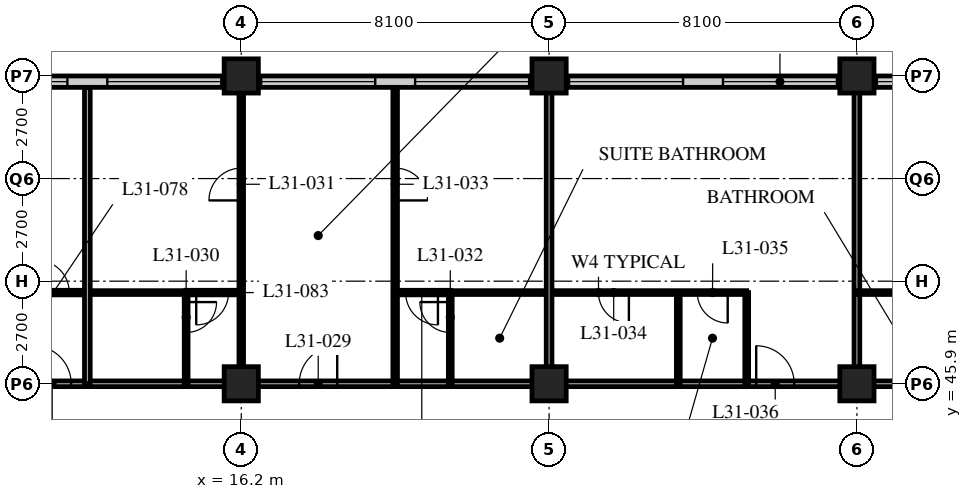
"""IFC4 building model, lengths in metres.
Left out: names, types, materials, properties, quantities, classifications, styles, units other than length and angle.
Written with IfcOpenShell. Run it as: python <this file> out.ifc"""

import sys

from ifc_helpers import new_model, si_unit, direction, frame, frame_2d, origin, origin_2d, place, context, subcontext, project, spatial, rectangle, hollow_rectangle, extrude, element, fill, save


model = new_model("IFC4")
c1 = context("Model", 3, precision=1e-05, world=origin(), true_north=direction((0.0, 1.0)))
c2 = subcontext(c1, "Body", "Model", "MODEL_VIEW")
j1 = project(units=[si_unit("LENGTHUNIT", "METRE"), si_unit("PLANEANGLEUNIT", "RADIAN")], contexts=[c1])
p1 = place(None, origin())
s1 = spatial("IfcSite", under=j1, at=p1, CompositionType="ELEMENT")
p2 = place(p1, origin())
s2 = spatial("IfcBuilding", under=s1, at=p2, CompositionType="ELEMENT")
p3 = place(p2, frame((0.0, 0.0, 123.8)))
s3 = spatial("IfcBuildingStorey", under=s2, at=p3, CompositionType="ELEMENT", Elevation=123.8)
for number, where, z_axis, x_axis in (
    (1, (16.2, 45.9, 0.0), (0.0, 0.0, 1.0), (1.0, 0.0, 0.0)),
    (2, (16.2, 54.0, 0.0), (0.0, 0.0, 1.0), (1.0, 0.0, 0.0)),
    (3, (24.3, 45.9, 0.0), (0.0, 0.0, 1.0), (1.0, 0.0, 0.0)),
    (4, (24.3, 54.0, 0.0), (0.0, 0.0, 1.0), (1.0, 0.0, 0.0)),
    (5, (32.4, 45.9, 0.0), (0.0, 0.0, 1.0), (1.0, 0.0, 0.0)),
    (6, (32.4, 54.0, 0.0), (0.0, 0.0, 1.0), (1.0, 0.0, 0.0)),
):
    element("IfcColumn", number, at=place(p3, frame(where, z_axis=z_axis, x_axis=x_axis)), inside=s3, PredefinedType="COLUMN", context=c2, shape_type="SweptSolid", body=[
        extrude(hollow_rectangle(XDim=0.9, YDim=0.9, WallThickness=0.09, at=origin_2d()), origin(), (0.0, 0.0, 1.0), 3.4),
    ])
p4 = place(p3, frame((48.3, 53.85, 0.0), z_axis=(0.0, 0.0, 1.0), x_axis=(-1.0, 0.0, 0.0)))
e7 = element("IfcWall", 7, at=p4, inside=s3, PredefinedType="SOLIDWALL", context=c2, shape_type="SweptSolid", body=[
    extrude(rectangle(XDim=40.2, YDim=0.3, at=frame_2d((20.1, 0.0))), origin(), (0.0, 0.0, 1.0), 3.19),
])
p5 = place(p4, frame((0.225, 0.0, 0.9)))
e8 = element("IfcOpeningElement", 8, at=p5, cuts=e7, PredefinedType="OPENING", context=c2, shape_type="SweptSolid", body=[
    extrude(rectangle(XDim=3.0, YDim=2.0, at=frame_2d((1.5, 1.0))), frame((0.0, 0.16, 0.0), z_axis=(0.0, -1.0, 0.0), x_axis=(1.0, 0.0, 0.0)), (0.0, 0.0, 1.0), 0.32),
])
p6 = place(p4, frame((4.275, 0.0, 0.9)))
e9 = element("IfcOpeningElement", 9, at=p6, cuts=e7, PredefinedType="OPENING", context=c2, shape_type="SweptSolid", body=[
    extrude(rectangle(XDim=3.0, YDim=2.0, at=frame_2d((1.5, 1.0))), frame((0.0, 0.16, 0.0), z_axis=(0.0, -1.0, 0.0), x_axis=(1.0, 0.0, 0.0)), (0.0, 0.0, 1.0), 0.32),
])
p7 = place(p4, frame((8.325, 0.0, 0.9)))
e10 = element("IfcOpeningElement", 10, at=p7, cuts=e7, PredefinedType="OPENING", context=c2, shape_type="SweptSolid", body=[
    extrude(rectangle(XDim=3.0, YDim=2.0, at=frame_2d((1.5, 1.0))), frame((0.0, 0.16, 0.0), z_axis=(0.0, -1.0, 0.0), x_axis=(1.0, 0.0, 0.0)), (0.0, 0.0, 1.0), 0.32),
])
p8 = place(p4, frame((12.375, 0.0, 0.9)))
e11 = element("IfcOpeningElement", 11, at=p8, cuts=e7, PredefinedType="OPENING", context=c2, shape_type="SweptSolid", body=[
    extrude(rectangle(XDim=3.0, YDim=2.0, at=frame_2d((1.5, 1.0))), frame((0.0, 0.16, 0.0), z_axis=(0.0, -1.0, 0.0), x_axis=(1.0, 0.0, 0.0)), (0.0, 0.0, 1.0), 0.32),
])
p9 = place(p4, frame((16.425, 0.0, 0.9)))
e12 = element("IfcOpeningElement", 12, at=p9, cuts=e7, PredefinedType="OPENING", context=c2, shape_type="SweptSolid", body=[
    extrude(rectangle(XDim=3.0, YDim=2.0, at=frame_2d((1.5, 1.0))), frame((0.0, 0.16, 0.0), z_axis=(0.0, -1.0, 0.0), x_axis=(1.0, 0.0, 0.0)), (0.0, 0.0, 1.0), 0.32),
])
p10 = place(p4, frame((20.475, 0.0, 0.9)))
e13 = element("IfcOpeningElement", 13, at=p10, cuts=e7, PredefinedType="OPENING", context=c2, shape_type="SweptSolid", body=[
    extrude(rectangle(XDim=3.0, YDim=2.0, at=frame_2d((1.5, 1.0))), frame((0.0, 0.16, 0.0), z_axis=(0.0, -1.0, 0.0), x_axis=(1.0, 0.0, 0.0)), (0.0, 0.0, 1.0), 0.32),
])
p11 = place(p4, frame((24.525, 0.0, 0.9)))
e14 = element("IfcOpeningElement", 14, at=p11, cuts=e7, PredefinedType="OPENING", context=c2, shape_type="SweptSolid", body=[
    extrude(rectangle(XDim=3.0, YDim=2.0, at=frame_2d((1.5, 1.0))), frame((0.0, 0.16, 0.0), z_axis=(0.0, -1.0, 0.0), x_axis=(1.0, 0.0, 0.0)), (0.0, 0.0, 1.0), 0.32),
])
p12 = place(p4, frame((28.575, 0.0, 0.9)))
e15 = element("IfcOpeningElement", 15, at=p12, cuts=e7, PredefinedType="OPENING", context=c2, shape_type="SweptSolid", body=[
    extrude(rectangle(XDim=3.0, YDim=2.0, at=frame_2d((1.5, 1.0))), frame((0.0, 0.16, 0.0), z_axis=(0.0, -1.0, 0.0), x_axis=(1.0, 0.0, 0.0)), (0.0, 0.0, 1.0), 0.32),
])
p13 = place(p4, frame((32.625, 0.0, 0.9)))
e16 = element("IfcOpeningElement", 16, at=p13, cuts=e7, PredefinedType="OPENING", context=c2, shape_type="SweptSolid", body=[
    extrude(rectangle(XDim=3.0, YDim=2.0, at=frame_2d((1.5, 1.0))), frame((0.0, 0.16, 0.0), z_axis=(0.0, -1.0, 0.0), x_axis=(1.0, 0.0, 0.0)), (0.0, 0.0, 1.0), 0.32),
])
p14 = place(p4, frame((36.675, 0.0, 0.9)))
e17 = element("IfcOpeningElement", 17, at=p14, cuts=e7, PredefinedType="OPENING", context=c2, shape_type="SweptSolid", body=[
    extrude(rectangle(XDim=3.0, YDim=2.0, at=frame_2d((1.5, 1.0))), frame((0.0, 0.16, 0.0), z_axis=(0.0, -1.0, 0.0), x_axis=(1.0, 0.0, 0.0)), (0.0, 0.0, 1.0), 0.32),
])
p15 = place(p3, frame((8.1, 45.9, 0.0), z_axis=(0.0, 0.0, 1.0), x_axis=(1.0, 0.0, 0.0)))
e18 = element("IfcWall", 18, at=p15, inside=s3, PredefinedType="PARTITIONING", context=c2, shape_type="SweptSolid", body=[
    extrude(rectangle(XDim=40.5, YDim=0.15, at=frame_2d((20.25, 0.0))), origin(), (0.0, 0.0, 1.0), 2.578),
])
p16 = place(p15, frame((9.625, 0.0, 0.0)))
e19 = element("IfcOpeningElement", 19, at=p16, cuts=e18, PredefinedType="OPENING", context=c2, shape_type="SweptSolid", body=[
    extrude(rectangle(XDim=1.0, YDim=2.1, at=frame_2d((0.5, 1.05))), frame((0.0, 0.085, 0.0), z_axis=(0.0, -1.0, 0.0), x_axis=(1.0, 0.0, 0.0)), (0.0, 0.0, 1.0), 0.17),
])
p17 = place(p15, frame((21.65, 0.0, 0.0)))
e20 = element("IfcOpeningElement", 20, at=p17, cuts=e18, PredefinedType="OPENING", context=c2, shape_type="SweptSolid", body=[
    extrude(rectangle(XDim=1.0, YDim=2.1, at=frame_2d((0.5, 1.05))), frame((0.0, 0.085, 0.0), z_axis=(0.0, -1.0, 0.0), x_axis=(1.0, 0.0, 0.0)), (0.0, 0.0, 1.0), 0.17),
])
p18 = place(p15, frame((26.75, 0.0, 0.0)))
e21 = element("IfcOpeningElement", 21, at=p18, cuts=e18, PredefinedType="OPENING", context=c2, shape_type="SweptSolid", body=[
    extrude(rectangle(XDim=1.0, YDim=2.1, at=frame_2d((0.5, 1.05))), frame((0.0, 0.085, 0.0), z_axis=(0.0, -1.0, 0.0), x_axis=(1.0, 0.0, 0.0)), (0.0, 0.0, 1.0), 0.17),
])
p19 = place(p15, frame((28.95, 0.0, 0.0)))
e22 = element("IfcOpeningElement", 22, at=p19, cuts=e18, PredefinedType="OPENING", context=c2, shape_type="SweptSolid", body=[
    extrude(rectangle(XDim=1.0, YDim=2.1, at=frame_2d((0.5, 1.05))), frame((0.0, 0.085, 0.0), z_axis=(0.0, -1.0, 0.0), x_axis=(1.0, 0.0, 0.0)), (0.0, 0.0, 1.0), 0.17),
])
p20 = place(p15, frame((34.85, 0.0, 0.0)))
e23 = element("IfcOpeningElement", 23, at=p20, cuts=e18, PredefinedType="OPENING", context=c2, shape_type="SweptSolid", body=[
    extrude(rectangle(XDim=1.0, YDim=2.1, at=frame_2d((0.5, 1.05))), frame((0.0, 0.085, 0.0), z_axis=(0.0, -1.0, 0.0), x_axis=(1.0, 0.0, 0.0)), (0.0, 0.0, 1.0), 0.17),
])
p21 = place(p15, frame((36.875, 0.0, 0.0)))
e24 = element("IfcOpeningElement", 24, at=p21, cuts=e18, PredefinedType="OPENING", context=c2, shape_type="SweptSolid", body=[
    extrude(rectangle(XDim=1.0, YDim=2.1, at=frame_2d((0.5, 1.05))), frame((0.0, 0.085, 0.0), z_axis=(0.0, -1.0, 0.0), x_axis=(1.0, 0.0, 0.0)), (0.0, 0.0, 1.0), 0.17),
])
p22 = place(p15, frame((2.625, 0.0, 0.0)))
e25 = element("IfcOpeningElement", 25, at=p22, cuts=e18, PredefinedType="OPENING", context=c2, shape_type="SweptSolid", body=[
    extrude(rectangle(XDim=1.0, YDim=2.1, at=frame_2d((0.5, 1.05))), frame((0.0, 0.085, 0.0), z_axis=(0.0, -1.0, 0.0), x_axis=(1.0, 0.0, 0.0)), (0.0, 0.0, 1.0), 0.17),
])
p23 = place(p3, frame((12.15, 48.3, 0.0), z_axis=(0.0, 0.0, 1.0), x_axis=(1.0, 0.0, 0.0)))
e26 = element("IfcWall", 26, at=p23, inside=s3, PredefinedType="PARTITIONING", context=c2, shape_type="SweptSolid", body=[
    extrude(rectangle(XDim=2.6, YDim=0.1, at=frame_2d((1.3, 0.0))), origin(), (0.0, 0.0, 1.0), 3.19),
])
p24 = place(p3, frame((14.75, 45.9, 0.0), z_axis=(0.0, 0.0, 1.0), x_axis=(0.0, 1.0, 0.0)))
e27 = element("IfcWall", 27, at=p24, inside=s3, PredefinedType="PARTITIONING", context=c2, shape_type="SweptSolid", body=[
    extrude(rectangle(XDim=2.4, YDim=0.1, at=frame_2d((1.2, 0.0))), origin(), (0.0, 0.0, 1.0), 3.19),
])
p25 = place(p24, frame((1.35, 0.0, 0.0)))
e28 = element("IfcOpeningElement", 28, at=p25, cuts=e27, PredefinedType="OPENING", context=c2, shape_type="SweptSolid", body=[
    extrude(rectangle(XDim=0.8, YDim=2.1, at=frame_2d((0.4, 1.05))), frame((0.0, 0.06, 0.0), z_axis=(0.0, -1.0, 0.0), x_axis=(1.0, 0.0, 0.0)), (0.0, 0.0, 1.0), 0.12),
])
p26 = place(p3, frame((16.2, 45.9, 0.0), z_axis=(0.0, 0.0, 1.0), x_axis=(0.0, 1.0, 0.0)))
e29 = element("IfcWall", 29, at=p26, inside=s3, PredefinedType="PARTITIONING", context=c2, shape_type="SweptSolid", body=[
    extrude(rectangle(XDim=7.8, YDim=0.12, at=frame_2d((3.9, 0.0))), origin(), (0.0, 0.0, 1.0), 2.578),
])
p27 = place(p26, frame((4.825, 0.0, 0.0)))
e30 = element("IfcOpeningElement", 30, at=p27, cuts=e29, PredefinedType="OPENING", context=c2, shape_type="SweptSolid", body=[
    extrude(rectangle(XDim=0.85, YDim=2.1, at=frame_2d((0.425, 1.05))), frame((0.0, 0.07, 0.0), z_axis=(0.0, -1.0, 0.0), x_axis=(1.0, 0.0, 0.0)), (0.0, 0.0, 1.0), 0.14),
])
p28 = place(p3, frame((21.7, 48.3, 0.0), z_axis=(0.0, 0.0, 1.0), x_axis=(1.0, 0.0, 0.0)))
e31 = element("IfcWall", 31, at=p28, inside=s3, PredefinedType="PARTITIONING", context=c2, shape_type="SweptSolid", body=[
    extrude(rectangle(XDim=7.8, YDim=0.1, at=frame_2d((3.9, 0.0))), origin(), (0.0, 0.0, 1.0), 3.19),
])
p29 = place(p28, frame((3.9, 0.0, 0.0)))
e32 = element("IfcOpeningElement", 32, at=p29, cuts=e31, PredefinedType="OPENING", context=c2, shape_type="SweptSolid", body=[
    extrude(rectangle(XDim=0.8, YDim=2.1, at=frame_2d((0.4, 1.05))), frame((0.0, 0.06, 0.0), z_axis=(0.0, -1.0, 0.0), x_axis=(1.0, 0.0, 0.0)), (0.0, 0.0, 1.0), 0.12),
])
p30 = place(p28, frame((6.5, 0.0, 0.0)))
e33 = element("IfcOpeningElement", 33, at=p30, cuts=e31, PredefinedType="OPENING", context=c2, shape_type="SweptSolid", body=[
    extrude(rectangle(XDim=0.8, YDim=2.1, at=frame_2d((0.4, 1.05))), frame((0.0, 0.06, 0.0), z_axis=(0.0, -1.0, 0.0), x_axis=(1.0, 0.0, 0.0)), (0.0, 0.0, 1.0), 0.12),
])
p31 = place(p3, frame((21.7, 45.9, 0.0), z_axis=(0.0, 0.0, 1.0), x_axis=(0.0, 1.0, 0.0)))
e34 = element("IfcWall", 34, at=p31, inside=s3, PredefinedType="PARTITIONING", context=c2, shape_type="SweptSolid", body=[
    extrude(rectangle(XDim=2.4, YDim=0.1, at=frame_2d((1.2, 0.0))), origin(), (0.0, 0.0, 1.0), 3.19),
])
p32 = place(p31, frame((1.35, 0.0, 0.0)))
e35 = element("IfcOpeningElement", 35, at=p32, cuts=e34, PredefinedType="OPENING", context=c2, shape_type="SweptSolid", body=[
    extrude(rectangle(XDim=0.8, YDim=2.1, at=frame_2d((0.4, 1.05))), frame((0.0, 0.06, 0.0), z_axis=(0.0, -1.0, 0.0), x_axis=(1.0, 0.0, 0.0)), (0.0, 0.0, 1.0), 0.12),
])
p33 = place(p3, frame((20.25, 45.9, 0.0), z_axis=(0.0, 0.0, 1.0), x_axis=(0.0, 1.0, 0.0)))
e36 = element("IfcWall", 36, at=p33, inside=s3, PredefinedType="PARTITIONING", context=c2, shape_type="SweptSolid", body=[
    extrude(rectangle(XDim=7.8, YDim=0.12, at=frame_2d((3.9, 0.0))), origin(), (0.0, 0.0, 1.0), 3.19),
])
p34 = place(p33, frame((4.825, 0.0, 0.0)))
e37 = element("IfcOpeningElement", 37, at=p34, cuts=e36, PredefinedType="OPENING", context=c2, shape_type="SweptSolid", body=[
    extrude(rectangle(XDim=0.85, YDim=2.1, at=frame_2d((0.425, 1.05))), frame((0.0, 0.07, 0.0), z_axis=(0.0, -1.0, 0.0), x_axis=(1.0, 0.0, 0.0)), (0.0, 0.0, 1.0), 0.14),
])
p35 = place(p3, frame((24.3, 45.9, 0.0), z_axis=(0.0, 0.0, 1.0), x_axis=(0.0, 1.0, 0.0)))
e38 = element("IfcWall", 38, at=p35, inside=s3, PredefinedType="PARTITIONING", context=c2, shape_type="SweptSolid", body=[
    extrude(rectangle(XDim=7.8, YDim=0.15, at=frame_2d((3.9, 0.0))), origin(), (0.0, 0.0, 1.0), 2.578),
])
for number, where, z_axis, x_axis in (
    (39, (27.7, 45.9, 0.0), (0.0, 0.0, 1.0), (0.0, 1.0, 0.0)),
    (40, (29.5, 45.9, 0.0), (0.0, 0.0, 1.0), (0.0, 1.0, 0.0)),
):
    element("IfcWall", number, at=place(p3, frame(where, z_axis=z_axis, x_axis=x_axis)), inside=s3, PredefinedType="PARTITIONING", context=c2, shape_type="SweptSolid", body=[
        extrude(rectangle(XDim=2.4, YDim=0.1, at=frame_2d((1.2, 0.0))), origin(), (0.0, 0.0, 1.0), 3.19),
    ])
p36 = place(p3, frame((32.4, 45.9, 0.0), z_axis=(0.0, 0.0, 1.0), x_axis=(0.0, 1.0, 0.0)))
e41 = element("IfcWall", 41, at=p36, inside=s3, PredefinedType="PARTITIONING", context=c2, shape_type="SweptSolid", body=[
    extrude(rectangle(XDim=7.8, YDim=0.15, at=frame_2d((3.9, 0.0))), origin(), (0.0, 0.0, 1.0), 2.578),
])
p37 = place(p3, frame((32.4, 48.3, 0.0), z_axis=(0.0, 0.0, 1.0), x_axis=(1.0, 0.0, 0.0)))
e42 = element("IfcWall", 42, at=p37, inside=s3, PredefinedType="PARTITIONING", context=c2, shape_type="SweptSolid", body=[
    extrude(rectangle(XDim=2.3, YDim=0.1, at=frame_2d((1.15, 0.0))), origin(), (0.0, 0.0, 1.0), 3.19),
])
p38 = place(p3, frame((8.1, 48.3, 0.0), z_axis=(0.0, 0.0, 1.0), x_axis=(1.0, 0.0, 0.0)))
e43 = element("IfcWall", 43, at=p38, inside=s3, PredefinedType="PARTITIONING", context=c2, shape_type="SweptSolid", body=[
    extrude(rectangle(XDim=4.05, YDim=0.12, at=frame_2d((2.025, 0.0))), origin(), (0.0, 0.0, 1.0), 3.19),
])
p39 = place(p38, frame((2.725, 0.0, 0.0)))
e44 = element("IfcOpeningElement", 44, at=p39, cuts=e43, PredefinedType="OPENING", context=c2, shape_type="SweptSolid", body=[
    extrude(rectangle(XDim=0.85, YDim=2.1, at=frame_2d((0.425, 1.05))), frame((0.0, 0.07, 0.0), z_axis=(0.0, -1.0, 0.0), x_axis=(1.0, 0.0, 0.0)), (0.0, 0.0, 1.0), 0.14),
])
p40 = place(p3, frame((12.15, 45.9, 0.0), z_axis=(0.0, 0.0, 1.0), x_axis=(0.0, 1.0, 0.0)))
e45 = element("IfcWall", 45, at=p40, inside=s3, PredefinedType="PARTITIONING", context=c2, shape_type="SweptSolid", body=[
    extrude(rectangle(XDim=7.8, YDim=0.15, at=frame_2d((3.9, 0.0))), origin(), (0.0, 0.0, 1.0), 3.19),
])
p41 = place(p3, frame((14.74, 48.3, 0.0), z_axis=(0.0, 0.0, 1.0), x_axis=(1.0, 0.0, 0.0)))
e46 = element("IfcWall", 46, at=p41, inside=s3, PredefinedType="PARTITIONING", context=c2, shape_type="SweptSolid", body=[
    extrude(rectangle(XDim=1.46, YDim=0.12, at=frame_2d((0.73, 0.0))), origin(), (0.0, 0.0, 1.0), 3.19),
])
p42 = place(p41, frame((0.275, 0.0, 0.0)))
e47 = element("IfcOpeningElement", 47, at=p42, cuts=e46, PredefinedType="OPENING", context=c2, shape_type="SweptSolid", body=[
    extrude(rectangle(XDim=0.85, YDim=2.1, at=frame_2d((0.425, 1.05))), frame((0.0, 0.07, 0.0), z_axis=(0.0, -1.0, 0.0), x_axis=(1.0, 0.0, 0.0)), (0.0, 0.0, 1.0), 0.14),
])
p43 = place(p3, frame((20.25, 48.3, 0.0), z_axis=(0.0, 0.0, 1.0), x_axis=(1.0, 0.0, 0.0)))
e48 = element("IfcWall", 48, at=p43, inside=s3, PredefinedType="PARTITIONING", context=c2, shape_type="SweptSolid", body=[
    extrude(rectangle(XDim=1.46, YDim=0.12, at=frame_2d((0.73, 0.0))), origin(), (0.0, 0.0, 1.0), 3.19),
])
p44 = place(p43, frame((0.275, 0.0, 0.0)))
e49 = element("IfcOpeningElement", 49, at=p44, cuts=e48, PredefinedType="OPENING", context=c2, shape_type="SweptSolid", body=[
    extrude(rectangle(XDim=0.85, YDim=2.1, at=frame_2d((0.425, 1.05))), frame((0.0, 0.07, 0.0), z_axis=(0.0, -1.0, 0.0), x_axis=(1.0, 0.0, 0.0)), (0.0, 0.0, 1.0), 0.14),
])
p45 = place(p8, origin())
e50 = element("IfcWindow", 50, at=p45, inside=s3, PartitioningType="SINGLE_PANEL", PredefinedType="WINDOW", context=c2, shape_type="SweptSolid", body=[
    extrude(rectangle(XDim=3.0, YDim=2.0, at=frame_2d((1.5, 1.0))), frame((0.0, 0.03, 0.0), z_axis=(0.0, -1.0, 0.0), x_axis=(1.0, 0.0, 0.0)), (0.0, 0.0, 1.0), 0.06),
])
fill(e11, e50)
p46 = place(p9, origin())
e51 = element("IfcWindow", 51, at=p46, inside=s3, PartitioningType="SINGLE_PANEL", PredefinedType="WINDOW", context=c2, shape_type="SweptSolid", body=[
    extrude(rectangle(XDim=3.0, YDim=2.0, at=frame_2d((1.5, 1.0))), frame((0.0, 0.03, 0.0), z_axis=(0.0, -1.0, 0.0), x_axis=(1.0, 0.0, 0.0)), (0.0, 0.0, 1.0), 0.06),
])
fill(e12, e51)
p47 = place(p10, origin())
e52 = element("IfcWindow", 52, at=p47, inside=s3, PartitioningType="SINGLE_PANEL", PredefinedType="WINDOW", context=c2, shape_type="SweptSolid", body=[
    extrude(rectangle(XDim=3.0, YDim=2.0, at=frame_2d((1.5, 1.0))), frame((0.0, 0.03, 0.0), z_axis=(0.0, -1.0, 0.0), x_axis=(1.0, 0.0, 0.0)), (0.0, 0.0, 1.0), 0.06),
])
fill(e13, e52)
p48 = place(p11, origin())
e53 = element("IfcWindow", 53, at=p48, inside=s3, PartitioningType="SINGLE_PANEL", PredefinedType="WINDOW", context=c2, shape_type="SweptSolid", body=[
    extrude(rectangle(XDim=3.0, YDim=2.0, at=frame_2d((1.5, 1.0))), frame((0.0, 0.03, 0.0), z_axis=(0.0, -1.0, 0.0), x_axis=(1.0, 0.0, 0.0)), (0.0, 0.0, 1.0), 0.06),
])
fill(e14, e53)
p49 = place(p12, origin())
e54 = element("IfcWindow", 54, at=p49, inside=s3, PartitioningType="SINGLE_PANEL", PredefinedType="WINDOW", context=c2, shape_type="SweptSolid", body=[
    extrude(rectangle(XDim=3.0, YDim=2.0, at=frame_2d((1.5, 1.0))), frame((0.0, 0.03, 0.0), z_axis=(0.0, -1.0, 0.0), x_axis=(1.0, 0.0, 0.0)), (0.0, 0.0, 1.0), 0.06),
])
fill(e15, e54)
p50 = place(p13, origin())
e55 = element("IfcWindow", 55, at=p50, inside=s3, PartitioningType="SINGLE_PANEL", PredefinedType="WINDOW", context=c2, shape_type="SweptSolid", body=[
    extrude(rectangle(XDim=3.0, YDim=2.0, at=frame_2d((1.5, 1.0))), frame((0.0, 0.03, 0.0), z_axis=(0.0, -1.0, 0.0), x_axis=(1.0, 0.0, 0.0)), (0.0, 0.0, 1.0), 0.06),
])
fill(e16, e55)
p51 = place(p14, origin())
e56 = element("IfcWindow", 56, at=p51, inside=s3, PartitioningType="SINGLE_PANEL", PredefinedType="WINDOW", context=c2, shape_type="SweptSolid", body=[
    extrude(rectangle(XDim=3.0, YDim=2.0, at=frame_2d((1.5, 1.0))), frame((0.0, 0.03, 0.0), z_axis=(0.0, -1.0, 0.0), x_axis=(1.0, 0.0, 0.0)), (0.0, 0.0, 1.0), 0.06),
])
fill(e17, e56)
p52 = place(p16, origin())
e57 = element("IfcDoor", 57, at=p52, inside=s3, OperationType="SINGLE_SWING_RIGHT", PredefinedType="DOOR", context=c2, shape_type="SweptSolid", body=[
    extrude(rectangle(XDim=1.0, YDim=2.1, at=frame_2d((0.5, 1.05))), frame((0.0, 0.025, 0.0), z_axis=(0.0, -1.0, 0.0), x_axis=(1.0, 0.0, 0.0)), (0.0, 0.0, 1.0), 0.05),
])
fill(e19, e57)
p53 = place(p25, origin())
e58 = element("IfcDoor", 58, at=p53, inside=s3, OperationType="SINGLE_SWING_LEFT", PredefinedType="DOOR", context=c2, shape_type="SweptSolid", body=[
    extrude(rectangle(XDim=0.8, YDim=2.1, at=frame_2d((0.4, 1.05))), frame((0.0, 0.025, 0.0), z_axis=(0.0, -1.0, 0.0), x_axis=(1.0, 0.0, 0.0)), (0.0, 0.0, 1.0), 0.05),
])
fill(e28, e58)
p54 = place(p27, origin())
e59 = element("IfcDoor", 59, at=p54, inside=s3, OperationType="SINGLE_SWING_LEFT", PredefinedType="DOOR", context=c2, shape_type="SweptSolid", body=[
    extrude(rectangle(XDim=0.85, YDim=2.1, at=frame_2d((0.425, 1.05))), frame((0.0, 0.025, 0.0), z_axis=(0.0, -1.0, 0.0), x_axis=(1.0, 0.0, 0.0)), (0.0, 0.0, 1.0), 0.05),
])
fill(e30, e59)
p55 = place(p32, origin())
e60 = element("IfcDoor", 60, at=p55, inside=s3, OperationType="SINGLE_SWING_RIGHT", PredefinedType="DOOR", context=c2, shape_type="SweptSolid", body=[
    extrude(rectangle(XDim=0.8, YDim=2.1, at=frame_2d((0.4, 1.05))), frame((0.0, 0.025, 0.0), z_axis=(0.0, -1.0, 0.0), x_axis=(1.0, 0.0, 0.0)), (0.0, 0.0, 1.0), 0.05),
])
fill(e35, e60)
p56 = place(p34, origin())
e61 = element("IfcDoor", 61, at=p56, inside=s3, OperationType="SINGLE_SWING_RIGHT", PredefinedType="DOOR", context=c2, shape_type="SweptSolid", body=[
    extrude(rectangle(XDim=0.85, YDim=2.1, at=frame_2d((0.425, 1.05))), frame((0.0, 0.025, 0.0), z_axis=(0.0, -1.0, 0.0), x_axis=(1.0, 0.0, 0.0)), (0.0, 0.0, 1.0), 0.05),
])
fill(e37, e61)
p57 = place(p29, origin())
e62 = element("IfcDoor", 62, at=p57, inside=s3, OperationType="SINGLE_SWING_LEFT", PredefinedType="DOOR", context=c2, shape_type="SweptSolid", body=[
    extrude(rectangle(XDim=0.8, YDim=2.1, at=frame_2d((0.4, 1.05))), frame((0.0, 0.025, 0.0), z_axis=(0.0, -1.0, 0.0), x_axis=(1.0, 0.0, 0.0)), (0.0, 0.0, 1.0), 0.05),
])
fill(e32, e62)
p58 = place(p30, origin())
e63 = element("IfcDoor", 63, at=p58, inside=s3, OperationType="SINGLE_SWING_LEFT", PredefinedType="DOOR", context=c2, shape_type="SweptSolid", body=[
    extrude(rectangle(XDim=0.8, YDim=2.1, at=frame_2d((0.4, 1.05))), frame((0.0, 0.025, 0.0), z_axis=(0.0, -1.0, 0.0), x_axis=(1.0, 0.0, 0.0)), (0.0, 0.0, 1.0), 0.05),
])
fill(e33, e63)
p59 = place(p17, origin())
e64 = element("IfcDoor", 64, at=p59, inside=s3, OperationType="SINGLE_SWING_LEFT", PredefinedType="DOOR", context=c2, shape_type="SweptSolid", body=[
    extrude(rectangle(XDim=1.0, YDim=2.1, at=frame_2d((0.5, 1.05))), frame((0.0, 0.025, 0.0), z_axis=(0.0, -1.0, 0.0), x_axis=(1.0, 0.0, 0.0)), (0.0, 0.0, 1.0), 0.05),
])
fill(e20, e64)
p60 = place(p22, origin())
e65 = element("IfcDoor", 65, at=p60, inside=s3, OperationType="SINGLE_SWING_LEFT", PredefinedType="DOOR", context=c2, shape_type="SweptSolid", body=[
    extrude(rectangle(XDim=1.0, YDim=2.1, at=frame_2d((0.5, 1.05))), frame((0.0, 0.025, 0.0), z_axis=(0.0, -1.0, 0.0), x_axis=(1.0, 0.0, 0.0)), (0.0, 0.0, 1.0), 0.05),
])
fill(e25, e65)
p61 = place(p39, origin())
e66 = element("IfcDoor", 66, at=p61, inside=s3, OperationType="SINGLE_SWING_LEFT", PredefinedType="DOOR", context=c2, shape_type="SweptSolid", body=[
    extrude(rectangle(XDim=0.85, YDim=2.1, at=frame_2d((0.425, 1.05))), frame((0.0, 0.025, 0.0), z_axis=(0.0, -1.0, 0.0), x_axis=(1.0, 0.0, 0.0)), (0.0, 0.0, 1.0), 0.05),
])
fill(e44, e66)
p62 = place(p42, origin())
e67 = element("IfcDoor", 67, at=p62, inside=s3, OperationType="SINGLE_SWING_RIGHT", PredefinedType="DOOR", context=c2, shape_type="SweptSolid", body=[
    extrude(rectangle(XDim=0.85, YDim=2.1, at=frame_2d((0.425, 1.05))), frame((0.0, 0.025, 0.0), z_axis=(0.0, -1.0, 0.0), x_axis=(1.0, 0.0, 0.0)), (0.0, 0.0, 1.0), 0.05),
])
fill(e47, e67)
p63 = place(p44, origin())
e68 = element("IfcDoor", 68, at=p63, inside=s3, OperationType="SINGLE_SWING_LEFT", PredefinedType="DOOR", context=c2, shape_type="SweptSolid", body=[
    extrude(rectangle(XDim=0.85, YDim=2.1, at=frame_2d((0.425, 1.05))), frame((0.0, 0.025, 0.0), z_axis=(0.0, -1.0, 0.0), x_axis=(1.0, 0.0, 0.0)), (0.0, 0.0, 1.0), 0.05),
])
fill(e49, e68)
save(model, sys.argv[1])
